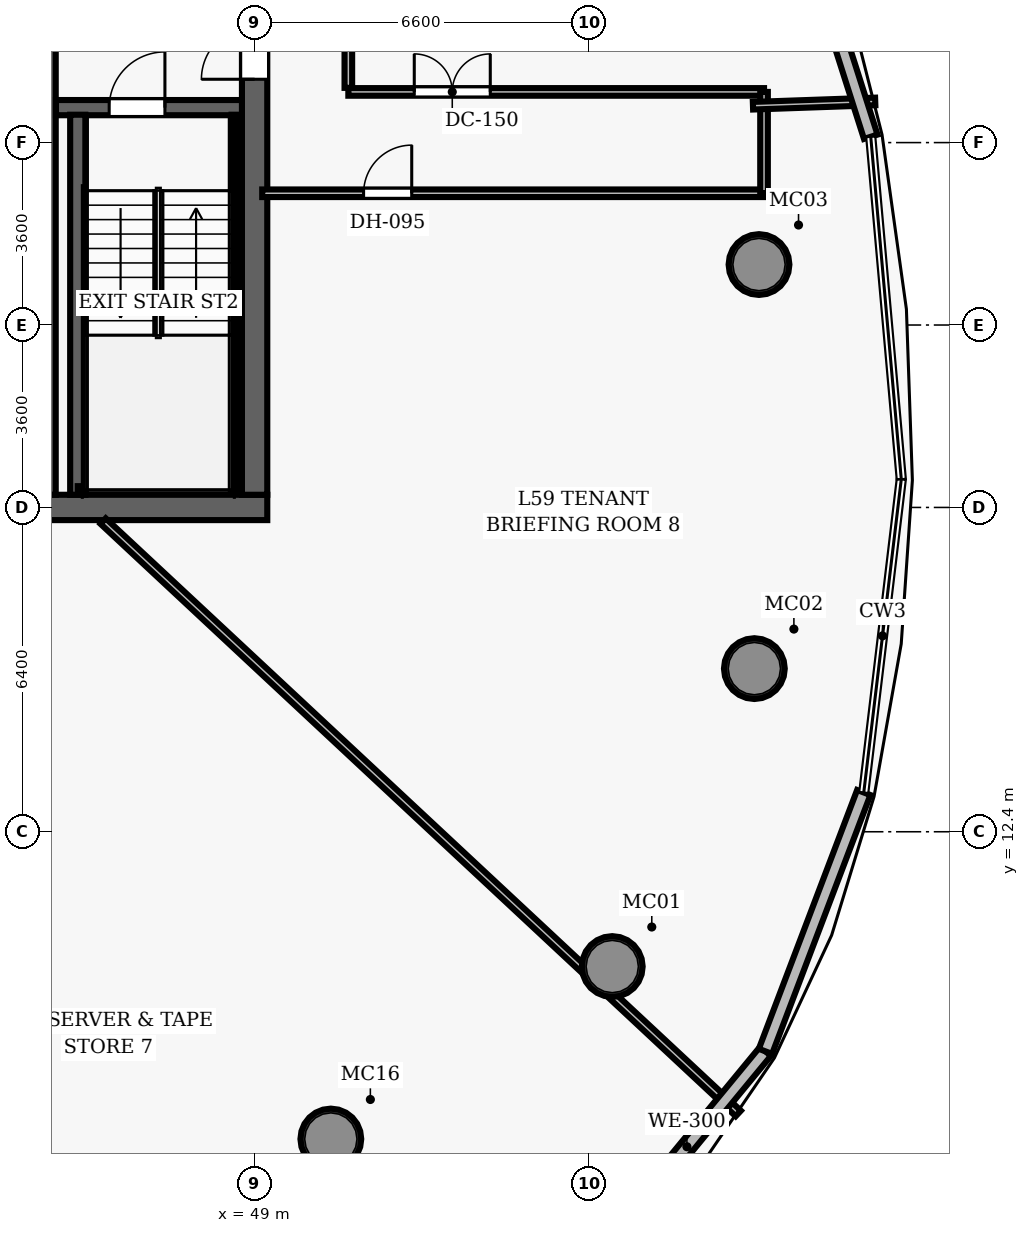
"""IFC4 building model, lengths in metres.
Left out: names, types, materials, properties, quantities, classifications, styles, units other than length and angle.
Written with IfcOpenShell. Run it as: python <this file> out.ifc"""

import sys

from ifc_helpers import new_model, si_unit, direction, frame, frame_2d, origin, origin_2d, place, context, subcontext, project, spatial, rectangle, hollow_circle, extrude, element, fill, save


model = new_model("IFC4")
c1 = context("Model", 3, precision=1e-05, world=origin(), true_north=direction((0.0, 1.0)))
c2 = subcontext(c1, "Body", "Model", "MODEL_VIEW")
j1 = project(units=[si_unit("LENGTHUNIT", "METRE"), si_unit("PLANEANGLEUNIT", "RADIAN")], contexts=[c1])
p1 = place(None, origin())
s1 = spatial("IfcSite", under=j1, at=p1, CompositionType="ELEMENT")
p2 = place(p1, origin())
s2 = spatial("IfcBuilding", under=s1, at=p2, CompositionType="ELEMENT")
p3 = place(p2, frame((0.0, 0.0, 232.8)))
s3 = spatial("IfcBuildingStorey", under=s2, at=p3, CompositionType="ELEMENT", Elevation=232.8)
p4 = place(p3, frame((26.75, 18.8, 0.0), z_axis=(0.0, 0.0, 1.0), x_axis=(1.0, 0.0, 0.0)))
e1 = element("IfcWall", 1, at=p4, inside=s3, PredefinedType="SHEAR", context=c2, shape_type="SweptSolid", body=[
    extrude(rectangle(XDim=22.5, YDim=0.5, at=frame_2d((11.25, 0.0))), origin(), (0.0, 0.0, 1.0), 3.85),
])
p5 = place(p4, frame((14.47, 0.0, 0.0)))
e2 = element("IfcOpeningElement", 2, at=p5, cuts=e1, PredefinedType="OPENING", context=c2, shape_type="SweptSolid", body=[
    extrude(rectangle(XDim=1.05, YDim=2.15, at=frame_2d((0.525, 1.075))), frame((0.0, 0.26, 0.0), z_axis=(0.0, -1.0, 0.0), x_axis=(1.0, 0.0, 0.0)), (0.0, 0.0, 1.0), 0.52),
])
p6 = place(p3, frame((49.0, 19.05, 0.0), z_axis=(0.0, 0.0, 1.0), x_axis=(0.0, 1.0, 0.0)))
e3 = element("IfcWall", 3, at=p6, inside=s3, PredefinedType="SHEAR", context=c2, shape_type="SweptSolid", body=[
    extrude(rectangle(XDim=13.9, YDim=0.5, at=frame_2d((6.95, 0.0))), origin(), (0.0, 0.0, 1.0), 3.85),
])
p7 = place(p6, frame((8.2, 0.0, 0.0)))
e4 = element("IfcOpeningElement", 4, at=p7, cuts=e3, PredefinedType="OPENING", context=c2, shape_type="SweptSolid", body=[
    extrude(rectangle(XDim=1.05, YDim=2.15, at=frame_2d((0.525, 1.075))), frame((0.0, 0.26, 0.0), z_axis=(0.0, -1.0, 0.0), x_axis=(1.0, 0.0, 0.0)), (0.0, 0.0, 1.0), 0.52),
])
p8 = place(p3, frame((44.9, 19.05, 0.0), z_axis=(0.0, 0.0, 1.0), x_axis=(0.0, 1.0, 0.0)))
e5 = element("IfcWall", 5, at=p8, inside=s3, PredefinedType="SHEAR", context=c2, shape_type="SweptSolid", body=[
    extrude(rectangle(XDim=13.9, YDim=0.35, at=frame_2d((6.95, 0.0))), origin(), (0.0, 0.0, 1.0), 3.85),
])
for number, where, z_axis, x_axis in (
    (6, (56.058, 9.74, 0.0), (0.0, 0.0, 1.0), (1.0, 0.0, 0.0)),
    (7, (58.863, 15.619, 0.0), (0.0, 0.0, 1.0), (1.0, 0.0, 0.0)),
    (8, (58.955, 23.594, 0.0), (0.0, 0.0, 1.0), (1.0, 0.0, 0.0)),
    (9, (50.504, 6.336, 0.0), (0.0, 0.0, 1.0), (1.0, 0.0, 0.0)),
):
    element("IfcColumn", number, at=place(p3, frame(where, z_axis=z_axis, x_axis=x_axis)), inside=s3, PredefinedType="COLUMN", context=c2, shape_type="SweptSolid", body=[
        extrude(hollow_circle(Radius=0.6, WallThickness=0.05, at=origin_2d()), origin(), (0.0, 0.0, 1.0), 3.85),
    ])
p9 = place(p3, frame((45.08, 26.69, 0.0), z_axis=(0.0, 0.0, 1.0), x_axis=(1.0, 0.0, 0.0)))
e10 = element("IfcWall", 10, at=p9, inside=s3, PredefinedType="SHEAR", context=c2, shape_type="SweptSolid", body=[
    extrude(rectangle(XDim=3.67, YDim=0.3, at=frame_2d((1.835, 0.0))), origin(), (0.0, 0.0, 1.0), 3.85),
])
p10 = place(p9, frame((1.05, 0.0, 0.0)))
e11 = element("IfcOpeningElement", 11, at=p10, cuts=e10, PredefinedType="OPENING", context=c2, shape_type="SweptSolid", body=[
    extrude(rectangle(XDim=1.1, YDim=2.15, at=frame_2d((0.55, 1.075))), frame((0.0, 0.16, 0.0), z_axis=(0.0, -1.0, 0.0), x_axis=(1.0, 0.0, 0.0)), (0.0, 0.0, 1.0), 0.32),
])
p11 = place(p3, frame((45.51, 19.05, 0.0), z_axis=(0.0, 0.0, 1.0), x_axis=(0.0, 1.0, 0.0)))
e12 = element("IfcWall", 12, at=p11, inside=s3, PredefinedType="SHEAR", context=c2, shape_type="SweptSolid", body=[
    extrude(rectangle(XDim=7.5, YDim=0.3, at=frame_2d((3.75, 0.0))), origin(), (0.0, 0.0, 1.0), 3.85),
])
p12 = place(p3, frame((48.605, 19.1, 0.0), z_axis=(0.0, 0.0, 1.0), x_axis=(0.0, 1.0, 0.0)))
e13 = element("IfcWall", 13, at=p12, inside=s3, PredefinedType="SHEAR", context=c2, shape_type="SweptSolid", body=[
    extrude(rectangle(XDim=7.45, YDim=0.12, at=frame_2d((3.725, 0.0))), origin(), (0.0, 0.0, 1.0), 3.85),
])
p13 = place(p3, frame((45.51, 19.16, 0.0), z_axis=(0.0, 0.0, 1.0), x_axis=(1.0, 0.0, 0.0)))
e14 = element("IfcWall", 14, at=p13, inside=s3, PredefinedType="SHEAR", context=c2, shape_type="SweptSolid", body=[
    extrude(rectangle(XDim=3.095, YDim=0.12, at=frame_2d((1.547, 0.0))), origin(), (0.0, 0.0, 1.0), 3.85),
])
p14 = place(p3, frame((50.85, 27.08, 0.0), z_axis=(0.0, 0.0, 1.0), x_axis=(0.0, 1.0, 0.0)))
e15 = element("IfcWall", 15, at=p14, inside=s3, PredefinedType="PARTITIONING", context=c2, shape_type="SweptSolid", body=[
    extrude(rectangle(XDim=8.12, YDim=0.15, at=frame_2d((4.06, 0.0))), origin(), (0.0, 0.0, 1.0), 2.915),
])
p15 = place(p3, frame((50.85, 27.0, 0.0), z_axis=(0.0, 0.0, 1.0), x_axis=(1.0, 0.0, 0.0)))
e16 = element("IfcWall", 16, at=p15, inside=s3, PredefinedType="PARTITIONING", context=c2, shape_type="SweptSolid", body=[
    extrude(rectangle(XDim=8.204, YDim=0.15, at=frame_2d((4.102, 0.0))), origin(), (0.0, 0.0, 1.0), 2.915),
])
p16 = place(p15, frame((1.301, 0.0, 0.0)))
e17 = element("IfcOpeningElement", 17, at=p16, cuts=e16, PredefinedType="OPENING", context=c2, shape_type="SweptSolid", body=[
    extrude(rectangle(XDim=1.5, YDim=2.2, at=frame_2d((0.75, 1.1))), frame((0.0, 0.085, 0.0), z_axis=(0.0, -1.0, 0.0), x_axis=(1.0, 0.0, 0.0)), (0.0, 0.0, 1.0), 0.17),
])
p17 = place(p3, frame((49.15, 25.0, 0.0), z_axis=(0.0, 0.0, 1.0), x_axis=(1.0, 0.0, 0.0)))
e18 = element("IfcWall", 18, at=p17, inside=s3, PredefinedType="PARTITIONING", context=c2, shape_type="SweptSolid", body=[
    extrude(rectangle(XDim=9.904, YDim=0.15, at=frame_2d((4.952, 0.0))), origin(), (0.0, 0.0, 1.0), 2.915),
])
p18 = place(p17, frame((2.001, 0.0, 0.0)))
e19 = element("IfcOpeningElement", 19, at=p18, cuts=e18, PredefinedType="OPENING", context=c2, shape_type="SweptSolid", body=[
    extrude(rectangle(XDim=0.95, YDim=2.15, at=frame_2d((0.475, 1.075))), frame((0.0, 0.085, 0.0), z_axis=(0.0, -1.0, 0.0), x_axis=(1.0, 0.0, 0.0)), (0.0, 0.0, 1.0), 0.17),
])
p19 = place(p3, frame((59.054, 25.0, 0.0), z_axis=(0.0, 0.0, 1.0), x_axis=(0.0, 1.0, 0.0)))
e20 = element("IfcWall", 20, at=p19, inside=s3, PredefinedType="PARTITIONING", context=c2, shape_type="SweptSolid", body=[
    extrude(rectangle(XDim=2.0, YDim=0.15, at=frame_2d((1.0, 0.0))), origin(), (0.0, 0.0, 1.0), 2.915),
])
p20 = place(p3, frame((58.835, 26.728, 0.0), z_axis=(0.0, 0.0, 1.0), x_axis=(0.999387726296, 0.034988177001, 0.0)))
e21 = element("IfcWall", 21, at=p20, inside=s3, PredefinedType="PARTITIONING", context=c2, shape_type="SweptSolid", body=[
    extrude(rectangle(XDim=2.414, YDim=0.15, at=frame_2d((1.207, 0.0))), origin(), (0.0, 0.0, 1.0), 2.915),
])
p21 = place(p3, frame((46.01, 18.53, 0.0), z_axis=(0.0, 0.0, 1.0), x_axis=(0.731354089415, -0.681997944202, 0.0)))
e22 = element("IfcWall", 22, at=p21, inside=s3, PredefinedType="PARTITIONING", context=c2, shape_type="SweptSolid", body=[
    extrude(rectangle(XDim=17.14, YDim=0.15, at=frame_2d((8.57, 0.0))), origin(), (0.0, 0.0, 1.0), 2.915),
])
p22 = place(p3, frame((59.082, 8.066, 0.0), z_axis=(0.0, 0.0, 1.0), x_axis=(-0.635840615574, -0.771820388165, 0.0)))
e23 = element("IfcWall", 23, at=p22, inside=s3, PredefinedType="SOLIDWALL", context=c2, shape_type="SweptSolid", body=[
    extrude(rectangle(XDim=4.876, YDim=0.28, at=frame_2d((2.438, 0.0))), origin(), (0.0, 0.0, 1.0), 3.5),
])
p23 = place(p3, frame((61.022, 13.175, 0.0), z_axis=(0.0, 0.0, 1.0), x_axis=(-0.355042078818, -0.934850320783, 0.0)))
e24 = element("IfcWall", 24, at=p23, inside=s3, PredefinedType="SOLIDWALL", context=c2, shape_type="SweptSolid", body=[
    extrude(rectangle(XDim=5.465, YDim=0.28, at=frame_2d((2.732, 0.0))), origin(), (0.0, 0.0, 1.0), 3.5),
])
p24 = place(p3, frame((59.031, 32.802, 0.0), z_axis=(0.0, 0.0, 1.0), x_axis=(0.303361607716, -0.952875508639, 0.0)))
e25 = element("IfcWall", 25, at=p24, inside=s3, PredefinedType="SOLIDWALL", context=c2, shape_type="SweptSolid", body=[
    extrude(rectangle(XDim=7.018, YDim=0.28, at=frame_2d((3.509, 0.0))), origin(), (0.0, 0.0, 1.0), 3.5),
])
p25 = place(p10, origin())
e26 = element("IfcDoor", 26, at=p25, inside=s3, OperationType="SINGLE_SWING_RIGHT", PredefinedType="DOOR", context=c2, shape_type="SweptSolid", body=[
    extrude(rectangle(XDim=1.1, YDim=2.15, at=frame_2d((0.55, 1.075))), frame((0.0, 0.025, 0.0), z_axis=(0.0, -1.0, 0.0), x_axis=(1.0, 0.0, 0.0)), (0.0, 0.0, 1.0), 0.05),
])
fill(e11, e26)
p26 = place(p7, origin())
e27 = element("IfcDoor", 27, at=p26, inside=s3, OperationType="SINGLE_SWING_LEFT", PredefinedType="DOOR", context=c2, shape_type="SweptSolid", body=[
    extrude(rectangle(XDim=1.05, YDim=2.15, at=frame_2d((0.525, 1.075))), frame((0.0, 0.025, 0.0), z_axis=(0.0, -1.0, 0.0), x_axis=(1.0, 0.0, 0.0)), (0.0, 0.0, 1.0), 0.05),
])
fill(e4, e27)
p27 = place(p16, origin())
e28 = element("IfcDoor", 28, at=p27, inside=s3, OperationType="DOUBLE_DOOR_SINGLE_SWING", PredefinedType="DOOR", context=c2, shape_type="SweptSolid", body=[
    extrude(rectangle(XDim=1.5, YDim=2.2, at=frame_2d((0.75, 1.1))), frame((0.0, 0.025, 0.0), z_axis=(0.0, -1.0, 0.0), x_axis=(1.0, 0.0, 0.0)), (0.0, 0.0, 1.0), 0.05),
])
fill(e17, e28)
p28 = place(p18, origin())
e29 = element("IfcDoor", 29, at=p28, inside=s3, OperationType="SINGLE_SWING_RIGHT", PredefinedType="DOOR", context=c2, shape_type="SweptSolid", body=[
    extrude(rectangle(XDim=0.95, YDim=2.15, at=frame_2d((0.475, 1.075))), frame((0.0, 0.025, 0.0), z_axis=(0.0, -1.0, 0.0), x_axis=(1.0, 0.0, 0.0)), (0.0, 0.0, 1.0), 0.05),
])
fill(e19, e29)
save(model, sys.argv[1])
